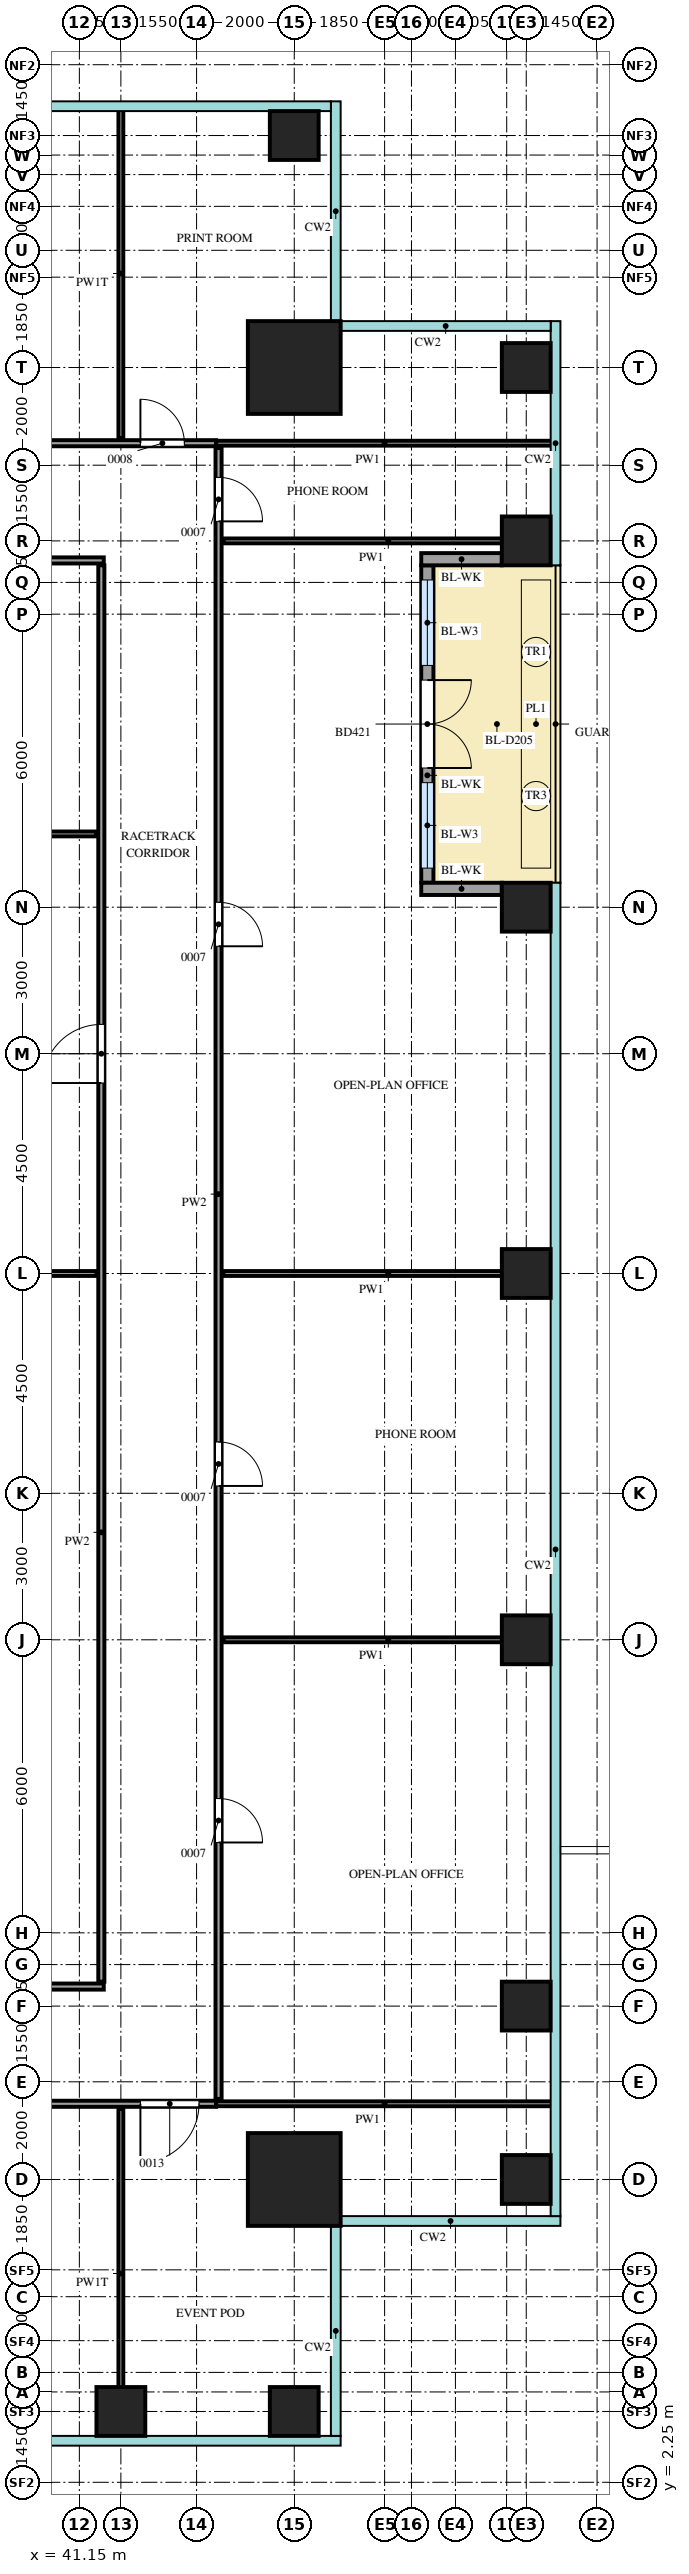
"""IFC4 building model, lengths in metres.
Left out: names, types, materials, properties, quantities, classifications, styles, units other than length and angle.
Written with IfcOpenShell. Run it as: python <this file> out.ifc"""

import sys

from ifc_helpers import new_model, si_unit, direction, frame, frame_2d, origin, origin_2d, place, context, subcontext, project, spatial, rectangle, extrude, source, transform, mapped, element, fill, save


model = new_model("IFC4")
c1 = context("Model", 3, precision=1e-05, world=origin(), true_north=direction((0.0, 1.0)))
c2 = subcontext(c1, "Body", "Model", "MODEL_VIEW")
j1 = project(units=[si_unit("LENGTHUNIT", "METRE"), si_unit("PLANEANGLEUNIT", "RADIAN")], contexts=[c1])
p1 = place(None, origin())
s1 = spatial("IfcSite", under=j1, at=p1, CompositionType="ELEMENT")
p2 = place(p1, origin())
s2 = spatial("IfcBuilding", under=s1, at=p2, CompositionType="ELEMENT")
p3 = place(p2, frame((0.0, 0.0, 192.7)))
s3 = spatial("IfcBuildingStorey", under=s2, at=p3, CompositionType="ELEMENT", Elevation=192.7)
m1 = source(origin(), c2, "Body", "SweptSolid", [
    extrude(rectangle(XDim=1.9, YDim=1.9, at=origin_2d()), origin(), (0.0, 0.0, 1.0), 4.0),
])
for number, where, z_axis, x_axis in (
    (1, (45.55, 45.55, 0.0), (0.0, 0.0, 1.0), (1.0, 0.0, 0.0)),
    (2, (45.55, 8.45, 0.0), (0.0, 0.0, 1.0), (1.0, 0.0, 0.0)),
):
    element("IfcColumn", number, at=place(p3, frame(where, z_axis=z_axis, x_axis=x_axis)), inside=s3, PredefinedType="COLUMN", context=c2, shape_type="MappedRepresentation", body=[
        mapped(m1, transform((0.0, 0.0, 0.0))),
    ])
m2 = source(origin(), c2, "Body", "SweptSolid", [
    extrude(rectangle(XDim=1.0, YDim=1.0, at=origin_2d()), origin(), (0.0, 0.0, 1.0), 3.75),
])
for number, where, z_axis, x_axis in (
    (3, (42.0, 3.7, 0.0), (0.0, 0.0, 1.0), (1.0, 0.0, 0.0)),
    (4, (45.55, 3.7, 0.0), (0.0, 0.0, 1.0), (1.0, 0.0, 0.0)),
    (5, (50.3, 8.45, 0.0), (0.0, 0.0, 1.0), (1.0, 0.0, 0.0)),
    (6, (50.3, 12.0, 0.0), (0.0, 0.0, 1.0), (1.0, 0.0, 0.0)),
    (7, (50.3, 19.5, 0.0), (0.0, 0.0, 1.0), (1.0, 0.0, 0.0)),
    (8, (50.3, 27.0, 0.0), (0.0, 0.0, 1.0), (1.0, 0.0, 0.0)),
    (9, (50.3, 34.5, 0.0), (0.0, 0.0, 1.0), (1.0, 0.0, 0.0)),
    (10, (50.3, 42.0, 0.0), (0.0, 0.0, 1.0), (1.0, 0.0, 0.0)),
    (11, (50.3, 45.55, 0.0), (0.0, 0.0, 1.0), (1.0, 0.0, 0.0)),
    (12, (45.55, 50.3, 0.0), (0.0, 0.0, 1.0), (1.0, 0.0, 0.0)),
):
    element("IfcColumn", number, at=place(p3, frame(where, z_axis=z_axis, x_axis=x_axis)), inside=s3, PredefinedType="COLUMN", context=c2, shape_type="MappedRepresentation", body=[
        mapped(m2, transform((0.0, 0.0, 0.0))),
    ])
m3 = source(origin(), c2, "Body", "SweptSolid", [
    extrude(rectangle(XDim=6.5, YDim=0.25, at=frame_2d((3.25, 0.0))), origin(), (0.0, 0.0, 1.0), 3.15),
])
p4 = place(p3, frame((48.275, 35.0, 0.0), z_axis=(0.0, 0.0, 1.0), x_axis=(0.0, 1.0, 0.0)))
e13 = element("IfcWall", 13, at=p4, inside=s3, PredefinedType="SOLIDWALL", context=c2, shape_type="MappedRepresentation", body=[
    mapped(m3, transform((0.0, 0.0, 0.0))),
])
m4 = source(origin(), c2, "Body", "SweptSolid", [
    extrude(rectangle(XDim=1.75, YDim=2.4, at=frame_2d((0.875, 1.2))), frame((0.0, 0.135, 0.0), z_axis=(0.0, -1.0, 0.0), x_axis=(1.0, 0.0, 0.0)), (0.0, 0.0, 1.0), 0.27),
])
p5 = place(p4, frame((0.3, 0.0, 0.0)))
e14 = element("IfcOpeningElement", 14, at=p5, cuts=e13, PredefinedType="OPENING", context=c2, shape_type="MappedRepresentation", body=[
    mapped(m4, transform((0.0, 0.0, 0.0))),
])
p6 = place(p4, frame((4.45, 0.0, 0.0)))
e15 = element("IfcOpeningElement", 15, at=p6, cuts=e13, PredefinedType="OPENING", context=c2, shape_type="MappedRepresentation", body=[
    mapped(m4, transform((0.0, 0.0, 0.0))),
])
m5 = source(origin(), c2, "Body", "SweptSolid", [
    extrude(rectangle(XDim=1.8, YDim=2.4, at=frame_2d((0.9, 1.2))), frame((0.0, 0.135, 0.0), z_axis=(0.0, -1.0, 0.0), x_axis=(1.0, 0.0, 0.0)), (0.0, 0.0, 1.0), 0.27),
])
p7 = place(p4, frame((2.35, 0.0, 0.0)))
e16 = element("IfcOpeningElement", 16, at=p7, cuts=e13, PredefinedType="OPENING", context=c2, shape_type="MappedRepresentation", body=[
    mapped(m5, transform((0.0, 0.0, 0.0))),
])
m6 = source(origin(), c2, "Body", "SweptSolid", [
    extrude(rectangle(XDim=1.65, YDim=0.25, at=frame_2d((0.825, 0.0))), origin(), (0.0, 0.0, 1.0), 3.15),
])
for number, where, z_axis, x_axis in (
    (17, (49.8, 34.875, 0.0), (0.0, 0.0, 1.0), (-1.0, 0.0, 0.0)),
    (18, (49.8, 41.625, 0.0), (0.0, 0.0, 1.0), (-1.0, 0.0, 0.0)),
):
    element("IfcWall", number, at=place(p3, frame(where, z_axis=z_axis, x_axis=x_axis)), inside=s3, PredefinedType="SOLIDWALL", context=c2, shape_type="MappedRepresentation", body=[
        mapped(m6, transform((0.0, 0.0, 0.0))),
    ])
m7 = source(origin(), c2, "Body", "SweptSolid", [
    extrude(rectangle(XDim=6.75, YDim=0.1, at=frame_2d((3.375, 0.0))), origin(), (0.0, 0.0, 1.0), 3.3),
])
p8 = place(p3, frame((42.0, 3.15, 0.0), z_axis=(0.0, 0.0, 1.0), x_axis=(0.0, 1.0, 0.0)))
e19 = element("IfcWall", 19, at=p8, inside=s3, PredefinedType="PARTITIONING", context=c2, shape_type="MappedRepresentation", body=[
    mapped(m7, transform((0.0, 0.0, 0.0))),
])
m8 = source(origin(), c2, "Body", "SweptSolid", [
    extrude(rectangle(XDim=20.6, YDim=0.125, at=frame_2d((10.3, 0.0))), origin(), (0.0, 0.0, 1.0), 3.8),
])
p9 = place(p3, frame((23.35, 10.0, 0.0), z_axis=(0.0, 0.0, 1.0), x_axis=(1.0, 0.0, 0.0)))
e20 = element("IfcWall", 20, at=p9, inside=s3, PredefinedType="PARTITIONING", context=c2, shape_type="MappedRepresentation", body=[
    mapped(m8, transform((0.0, 0.0, 0.0))),
])
m9 = source(origin(), c2, "Body", "SweptSolid", [
    extrude(rectangle(XDim=0.9, YDim=2.1, at=frame_2d((0.45, 1.05))), frame((0.0, 0.073, 0.0), z_axis=(0.0, -1.0, 0.0), x_axis=(1.0, 0.0, 0.0)), (0.0, 0.0, 1.0), 0.145),
])
p10 = place(p9, frame((1.25, 0.0, 0.0)))
e21 = element("IfcOpeningElement", 21, at=p10, cuts=e20, PredefinedType="OPENING", context=c2, shape_type="MappedRepresentation", body=[
    mapped(m9, transform((0.0, 0.0, 0.0))),
])
m10 = source(origin(), c2, "Body", "SweptSolid", [
    extrude(rectangle(XDim=1.2, YDim=2.1, at=frame_2d((0.6, 1.05))), frame((0.0, 0.073, 0.0), z_axis=(0.0, -1.0, 0.0), x_axis=(1.0, 0.0, 0.0)), (0.0, 0.0, 1.0), 0.145),
])
p11 = place(p9, frame((10.55, 0.0, 0.0)))
e22 = element("IfcOpeningElement", 22, at=p11, cuts=e20, PredefinedType="OPENING", context=c2, shape_type="MappedRepresentation", body=[
    mapped(m10, transform((0.0, 0.0, 0.0))),
])
p12 = place(p9, frame((19.05, 0.0, 0.0)))
e23 = element("IfcOpeningElement", 23, at=p12, cuts=e20, PredefinedType="OPENING", context=c2, shape_type="MappedRepresentation", body=[
    mapped(m10, transform((0.0, 0.0, 0.0))),
])
m11 = source(origin(), c2, "Body", "SweptSolid", [
    extrude(rectangle(XDim=6.9, YDim=0.1, at=frame_2d((3.45, 0.0))), origin(), (0.0, 0.0, 1.0), 3.8),
])
p13 = place(p3, frame((43.95, 10.0, 0.0), z_axis=(0.0, 0.0, 1.0), x_axis=(1.0, 0.0, 0.0)))
e24 = element("IfcWall", 24, at=p13, inside=s3, PredefinedType="PARTITIONING", context=c2, shape_type="MappedRepresentation", body=[
    mapped(m11, transform((0.0, 0.0, 0.0))),
])
m12 = source(origin(), c2, "Body", "SweptSolid", [
    extrude(rectangle(XDim=33.8, YDim=0.125, at=frame_2d((16.9, 0.0))), origin(), (0.0, 0.0, 1.0), 3.8),
])
p14 = place(p3, frame((44.0, 10.1, 0.0), z_axis=(0.0, 0.0, 1.0), x_axis=(0.0, 1.0, 0.0)))
e25 = element("IfcWall", 25, at=p14, inside=s3, PredefinedType="PARTITIONING", context=c2, shape_type="MappedRepresentation", body=[
    mapped(m12, transform((0.0, 0.0, 0.0))),
])
p15 = place(p14, frame((5.25, 0.0, 0.0)))
e26 = element("IfcOpeningElement", 26, at=p15, cuts=e25, PredefinedType="OPENING", context=c2, shape_type="MappedRepresentation", body=[
    mapped(m9, transform((0.0, 0.0, 0.0))),
])
p16 = place(p14, frame((12.55, 0.0, 0.0)))
e27 = element("IfcOpeningElement", 27, at=p16, cuts=e25, PredefinedType="OPENING", context=c2, shape_type="MappedRepresentation", body=[
    mapped(m9, transform((0.0, 0.0, 0.0))),
])
p17 = place(p14, frame((23.6, 0.0, 0.0)))
e28 = element("IfcOpeningElement", 28, at=p17, cuts=e25, PredefinedType="OPENING", context=c2, shape_type="MappedRepresentation", body=[
    mapped(m9, transform((0.0, 0.0, 0.0))),
])
p18 = place(p14, frame((32.3, 0.0, 0.0)))
e29 = element("IfcOpeningElement", 29, at=p18, cuts=e25, PredefinedType="OPENING", context=c2, shape_type="MappedRepresentation", body=[
    mapped(m9, transform((0.0, 0.0, 0.0))),
])
m13 = source(origin(), c2, "Body", "SweptSolid", [
    extrude(rectangle(XDim=18.3, YDim=0.125, at=frame_2d((9.15, 0.0))), origin(), (0.0, 0.0, 1.0), 3.8),
])
p19 = place(p3, frame((23.35, 12.4, 0.0), z_axis=(0.0, 0.0, 1.0), x_axis=(1.0, 0.0, 0.0)))
e30 = element("IfcWall", 30, at=p19, inside=s3, PredefinedType="PARTITIONING", context=c2, shape_type="MappedRepresentation", body=[
    mapped(m13, transform((0.0, 0.0, 0.0))),
])
m14 = source(origin(), c2, "Body", "SweptSolid", [
    extrude(rectangle(XDim=29.0, YDim=0.125, at=frame_2d((14.5, 0.0))), origin(), (0.0, 0.0, 1.0), 3.8),
])
p20 = place(p3, frame((41.6, 12.5, 0.0), z_axis=(0.0, 0.0, 1.0), x_axis=(0.0, 1.0, 0.0)))
e31 = element("IfcWall", 31, at=p20, inside=s3, PredefinedType="PARTITIONING", context=c2, shape_type="MappedRepresentation", body=[
    mapped(m14, transform((0.0, 0.0, 0.0))),
])
p21 = place(p20, frame((18.4, 0.0, 0.0)))
e32 = element("IfcOpeningElement", 32, at=p21, cuts=e31, PredefinedType="OPENING", context=c2, shape_type="MappedRepresentation", body=[
    mapped(m10, transform((0.0, 0.0, 0.0))),
])
m15 = source(origin(), c2, "Body", "SweptSolid", [
    extrude(rectangle(XDim=6.75, YDim=0.1, at=frame_2d((3.375, 0.0))), origin(), (0.0, 0.0, 1.0), 3.8),
])
p22 = place(p3, frame((44.1, 19.5, 0.0), z_axis=(0.0, 0.0, 1.0), x_axis=(1.0, 0.0, 0.0)))
e33 = element("IfcWall", 33, at=p22, inside=s3, PredefinedType="PARTITIONING", context=c2, shape_type="MappedRepresentation", body=[
    mapped(m15, transform((0.0, 0.0, 0.0))),
])
m16 = source(origin(), c2, "Body", "SweptSolid", [
    extrude(rectangle(XDim=18.0, YDim=0.1, at=frame_2d((9.0, 0.0))), origin(), (0.0, 0.0, 1.0), 3.8),
])
p23 = place(p3, frame((23.5, 27.0, 0.0), z_axis=(0.0, 0.0, 1.0), x_axis=(1.0, 0.0, 0.0)))
e34 = element("IfcWall", 34, at=p23, inside=s3, PredefinedType="PARTITIONING", context=c2, shape_type="MappedRepresentation", body=[
    mapped(m16, transform((0.0, 0.0, 0.0))),
])
p24 = place(p3, frame((44.1, 27.0, 0.0), z_axis=(0.0, 0.0, 1.0), x_axis=(1.0, 0.0, 0.0)))
e35 = element("IfcWall", 35, at=p24, inside=s3, PredefinedType="PARTITIONING", context=c2, shape_type="MappedRepresentation", body=[
    mapped(m15, transform((0.0, 0.0, 0.0))),
])
m17 = source(origin(), c2, "Body", "SweptSolid", [
    extrude(rectangle(XDim=10.95, YDim=0.1, at=frame_2d((5.475, 0.0))), origin(), (0.0, 0.0, 1.0), 3.8),
])
p25 = place(p3, frame((30.55, 36.0, 0.0), z_axis=(0.0, 0.0, 1.0), x_axis=(1.0, 0.0, 0.0)))
e36 = element("IfcWall", 36, at=p25, inside=s3, PredefinedType="PARTITIONING", context=c2, shape_type="MappedRepresentation", body=[
    mapped(m17, transform((0.0, 0.0, 0.0))),
])
m18 = source(origin(), c2, "Body", "SweptSolid", [
    extrude(rectangle(XDim=11.1, YDim=0.125, at=frame_2d((5.55, 0.0))), origin(), (0.0, 0.0, 1.0), 3.8),
])
p26 = place(p3, frame((30.55, 41.6, 0.0), z_axis=(0.0, 0.0, 1.0), x_axis=(1.0, 0.0, 0.0)))
e37 = element("IfcWall", 37, at=p26, inside=s3, PredefinedType="PARTITIONING", context=c2, shape_type="MappedRepresentation", body=[
    mapped(m18, transform((0.0, 0.0, 0.0))),
])
p27 = place(p26, frame((5.25, 0.0, 0.0)))
e38 = element("IfcOpeningElement", 38, at=p27, cuts=e37, PredefinedType="OPENING", context=c2, shape_type="MappedRepresentation", body=[
    mapped(m9, transform((0.0, 0.0, 0.0))),
])
p28 = place(p3, frame((44.1, 42.0, 0.0), z_axis=(0.0, 0.0, 1.0), x_axis=(1.0, 0.0, 0.0)))
e39 = element("IfcWall", 39, at=p28, inside=s3, PredefinedType="PARTITIONING", context=c2, shape_type="MappedRepresentation", body=[
    mapped(m15, transform((0.0, 0.0, 0.0))),
])
m19 = source(origin(), c2, "Body", "SweptSolid", [
    extrude(rectangle(XDim=13.4, YDim=0.125, at=frame_2d((6.7, 0.0))), origin(), (0.0, 0.0, 1.0), 3.8),
])
p29 = place(p3, frame((30.55, 44.0, 0.0), z_axis=(0.0, 0.0, 1.0), x_axis=(1.0, 0.0, 0.0)))
e40 = element("IfcWall", 40, at=p29, inside=s3, PredefinedType="PARTITIONING", context=c2, shape_type="MappedRepresentation", body=[
    mapped(m19, transform((0.0, 0.0, 0.0))),
])
p30 = place(p29, frame((5.3, 0.0, 0.0)))
e41 = element("IfcOpeningElement", 41, at=p30, cuts=e40, PredefinedType="OPENING", context=c2, shape_type="MappedRepresentation", body=[
    mapped(m9, transform((0.0, 0.0, 0.0))),
])
p31 = place(p29, frame((11.85, 0.0, 0.0)))
e42 = element("IfcOpeningElement", 42, at=p31, cuts=e40, PredefinedType="OPENING", context=c2, shape_type="MappedRepresentation", body=[
    mapped(m9, transform((0.0, 0.0, 0.0))),
])
p32 = place(p3, frame((43.95, 44.0, 0.0), z_axis=(0.0, 0.0, 1.0), x_axis=(1.0, 0.0, 0.0)))
e43 = element("IfcWall", 43, at=p32, inside=s3, PredefinedType="PARTITIONING", context=c2, shape_type="MappedRepresentation", body=[
    mapped(m11, transform((0.0, 0.0, 0.0))),
])
p33 = place(p3, frame((42.0, 44.1, 0.0), z_axis=(0.0, 0.0, 1.0), x_axis=(0.0, 1.0, 0.0)))
e44 = element("IfcWall", 44, at=p33, inside=s3, PredefinedType="PARTITIONING", context=c2, shape_type="MappedRepresentation", body=[
    mapped(m7, transform((0.0, 0.0, 0.0))),
])
m20 = source(origin(), c2, "Body", "SweptSolid", [
    extrude(rectangle(XDim=1.75, YDim=2.4, at=frame_2d((0.875, 1.2))), frame((0.0, 0.03, 0.0), z_axis=(0.0, -1.0, 0.0), x_axis=(1.0, 0.0, 0.0)), (0.0, 0.0, 1.0), 0.06),
])
p34 = place(p5, origin())
e45 = element("IfcWindow", 45, at=p34, inside=s3, PartitioningType="SINGLE_PANEL", PredefinedType="WINDOW", context=c2, shape_type="MappedRepresentation", body=[
    mapped(m20, transform((0.0, 0.0, 0.0))),
])
fill(e14, e45)
p35 = place(p6, origin())
e46 = element("IfcWindow", 46, at=p35, inside=s3, PartitioningType="SINGLE_PANEL", PredefinedType="WINDOW", context=c2, shape_type="MappedRepresentation", body=[
    mapped(m20, transform((0.0, 0.0, 0.0))),
])
fill(e15, e46)
m21 = source(origin(), c2, "Body", "SweptSolid", [
    extrude(rectangle(XDim=1.8, YDim=2.4, at=frame_2d((0.9, 1.2))), frame((0.0, 0.025, 0.0), z_axis=(0.0, -1.0, 0.0), x_axis=(1.0, 0.0, 0.0)), (0.0, 0.0, 1.0), 0.05),
])
p36 = place(p7, origin())
e47 = element("IfcDoor", 47, at=p36, inside=s3, OperationType="DOUBLE_DOOR_DOUBLE_SWING", PredefinedType="DOOR", context=c2, shape_type="MappedRepresentation", body=[
    mapped(m21, transform((0.0, 0.0, 0.0))),
])
fill(e16, e47)
m22 = source(origin(), c2, "Body", "SweptSolid", [
    extrude(rectangle(XDim=1.2, YDim=2.1, at=frame_2d((0.6, 1.05))), frame((0.0, 0.025, 0.0), z_axis=(0.0, -1.0, 0.0), x_axis=(1.0, 0.0, 0.0)), (0.0, 0.0, 1.0), 0.05),
])
p37 = place(p12, origin())
e48 = element("IfcDoor", 48, at=p37, inside=s3, OperationType="SINGLE_SWING_LEFT", PredefinedType="DOOR", context=c2, shape_type="MappedRepresentation", body=[
    mapped(m22, transform((0.0, 0.0, 0.0))),
])
fill(e23, e48)
m23 = source(origin(), c2, "Body", "SweptSolid", [
    extrude(rectangle(XDim=0.9, YDim=2.1, at=frame_2d((0.45, 1.05))), frame((0.0, 0.025, 0.0), z_axis=(0.0, -1.0, 0.0), x_axis=(1.0, 0.0, 0.0)), (0.0, 0.0, 1.0), 0.05),
])
p38 = place(p15, origin())
e49 = element("IfcDoor", 49, at=p38, inside=s3, OperationType="SINGLE_SWING_LEFT", PredefinedType="DOOR", context=c2, shape_type="MappedRepresentation", body=[
    mapped(m23, transform((0.0, 0.0, 0.0))),
])
fill(e26, e49)
p39 = place(p16, origin())
e50 = element("IfcDoor", 50, at=p39, inside=s3, OperationType="SINGLE_SWING_LEFT", PredefinedType="DOOR", context=c2, shape_type="MappedRepresentation", body=[
    mapped(m23, transform((0.0, 0.0, 0.0))),
])
fill(e27, e50)
p40 = place(p17, origin())
e51 = element("IfcDoor", 51, at=p40, inside=s3, OperationType="SINGLE_SWING_LEFT", PredefinedType="DOOR", context=c2, shape_type="MappedRepresentation", body=[
    mapped(m23, transform((0.0, 0.0, 0.0))),
])
fill(e28, e51)
p41 = place(p18, origin())
e52 = element("IfcDoor", 52, at=p41, inside=s3, OperationType="SINGLE_SWING_LEFT", PredefinedType="DOOR", context=c2, shape_type="MappedRepresentation", body=[
    mapped(m23, transform((0.0, 0.0, 0.0))),
])
fill(e29, e52)
p42 = place(p31, origin())
e53 = element("IfcDoor", 53, at=p42, inside=s3, OperationType="SINGLE_SWING_RIGHT", PredefinedType="DOOR", context=c2, shape_type="MappedRepresentation", body=[
    mapped(m23, transform((0.0, 0.0, 0.0))),
])
fill(e42, e53)
p43 = place(p21, origin())
e54 = element("IfcDoor", 54, at=p43, inside=s3, OperationType="SINGLE_SWING_RIGHT", PredefinedType="DOOR", context=c2, shape_type="MappedRepresentation", body=[
    mapped(m22, transform((0.0, 0.0, 0.0))),
])
fill(e32, e54)
save(model, sys.argv[1])
